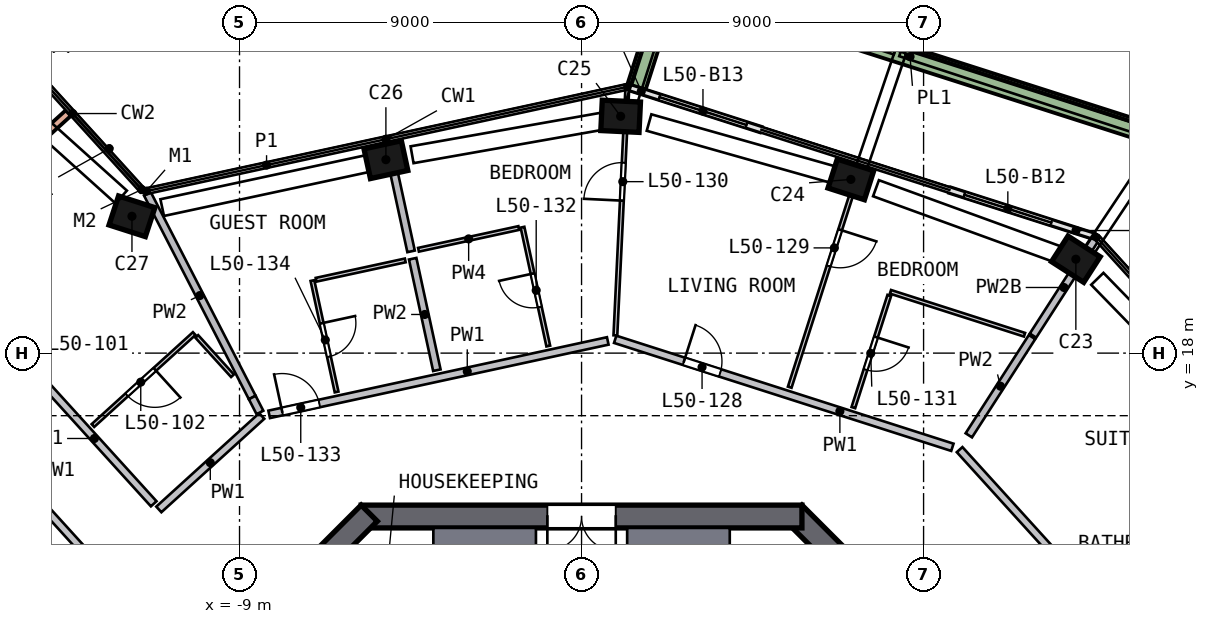
"""IFC4 building model, lengths in metres.
Left out: names, types, materials, properties, quantities, classifications, styles, units other than length and angle.
Written with IfcOpenShell. Run it as: python <this file> out.ifc"""

import sys

from ifc_helpers import new_model, si_unit, direction, frame, frame_2d, origin, origin_2d, place, context, subcontext, project, spatial, polyline, rectangle, outline, extrude, element, fill, save


model = new_model("IFC4")
c1 = context("Model", 3, precision=1e-05, world=origin(), true_north=direction((0.0, 1.0)))
c2 = subcontext(c1, "Body", "Model", "MODEL_VIEW")
j1 = project(units=[si_unit("LENGTHUNIT", "METRE"), si_unit("PLANEANGLEUNIT", "RADIAN")], contexts=[c1])
p1 = place(None, origin())
s1 = spatial("IfcSite", under=j1, at=p1, CompositionType="ELEMENT")
p2 = place(p1, origin())
s2 = spatial("IfcBuilding", under=s1, at=p2, CompositionType="ELEMENT")
p3 = place(p2, frame((0.0, 0.0, 205.5)))
s3 = spatial("IfcBuildingStorey", under=s2, at=p3, CompositionType="ELEMENT", Elevation=205.5)
p4 = place(p3, frame((13.125, 20.397, 0.0), z_axis=(-0.097538328, 0.061579147, 0.993324863), x_axis=(0.83540652, -0.537392943, 0.115346307)))
e1 = element("IfcColumn", 1, at=p4, inside=s3, PredefinedType="COLUMN", context=c2, shape_type="SweptSolid", body=[
    extrude(rectangle(XDim=1.0, YDim=0.8, at=origin_2d()), origin(), (0.0, 0.0, 1.0), 3.211),
])
p5 = place(p3, frame((7.217, 22.531, 0.0), z_axis=(-0.107456192, 0.033461235, 0.993646573), x_axis=(-0.946173408, 0.303463828, -0.11254149)))
e2 = element("IfcColumn", 2, at=p5, inside=s3, PredefinedType="COLUMN", context=c2, shape_type="SweptSolid", body=[
    extrude(rectangle(XDim=1.0, YDim=0.8, at=origin_2d()), origin(), (0.0, 0.0, 1.0), 3.21),
])
p6 = place(p3, frame((1.168, 24.227, 0.0), z_axis=(-0.115251947, 0.004561423, 0.993325819), x_axis=(0.992179948, -0.047708269, 0.115338076)))
e3 = element("IfcColumn", 3, at=p6, inside=s3, PredefinedType="COLUMN", context=c2, shape_type="SweptSolid", body=[
    extrude(rectangle(XDim=1.0, YDim=0.8, at=origin_2d()), origin(), (0.0, 0.0, 1.0), 3.211),
])
p7 = place(p3, frame((-5.016, 23.121, 0.0), z_axis=(-0.109813294, -0.024791644, 0.993643002), x_axis=(-0.971071774, -0.210587098, -0.112573017)))
e4 = element("IfcColumn", 4, at=p7, inside=s3, PredefinedType="COLUMN", context=c2, shape_type="SweptSolid", body=[
    extrude(rectangle(XDim=1.0, YDim=0.8, at=origin_2d()), origin(), (0.0, 0.0, 1.0), 3.21),
])
p8 = place(p3, frame((-11.707, 21.669, 0.0), z_axis=(-0.10253525, -0.056474196, 0.993124961), x_axis=(0.947085936, -0.310823275, 0.080106937)))
e5 = element("IfcColumn", 5, at=p8, inside=s3, PredefinedType="COLUMN", context=c2, shape_type="SweptSolid", body=[
    extrude(rectangle(XDim=1.0, YDim=0.8, at=origin_2d()), origin(), (0.0, 0.0, 1.0), 3.212),
])
p9 = place(p3, frame((13.788, 5.587, 0.0), z_axis=(0.0, 0.0, 1.0), x_axis=(-0.707106781, 0.707106781, 0.0)))
e6 = element("IfcWall", 6, at=p9, inside=s3, PredefinedType="SHEAR", context=c2, shape_type="SweptSolid", body=[
    extrude(rectangle(XDim=11.598, YDim=0.6, at=frame_2d((5.799, 0.0))), origin(), (0.0, 0.0, 1.0), 3.5),
])
p10 = place(p9, frame((2.099, 0.0, 0.0)))
e7 = element("IfcOpeningElement", 7, at=p10, cuts=e6, PredefinedType="OPENING", context=c2, shape_type="SweptSolid", body=[
    extrude(rectangle(XDim=1.2, YDim=2.1, at=frame_2d((0.6, 1.05))), frame((0.0, 0.31, 0.0), z_axis=(0.0, -1.0, 0.0), x_axis=(1.0, 0.0, 0.0)), (0.0, 0.0, 1.0), 0.62),
])
p11 = place(p3, frame((5.799, 13.7, 0.0), z_axis=(0.0, 0.0, 1.0), x_axis=(-1.0, 0.0, 0.0)))
e8 = element("IfcWall", 8, at=p11, inside=s3, PredefinedType="SHEAR", context=c2, shape_type="SweptSolid", body=[
    extrude(rectangle(XDim=11.598, YDim=0.6, at=frame_2d((5.799, 0.0))), origin(), (0.0, 0.0, 1.0), 3.5),
])
p12 = place(p11, frame((4.899, 0.0, 0.0)))
e9 = element("IfcOpeningElement", 9, at=p12, cuts=e8, PredefinedType="OPENING", context=c2, shape_type="SweptSolid", body=[
    extrude(rectangle(XDim=1.8, YDim=2.1, at=frame_2d((0.9, 1.05))), frame((0.0, 0.31, 0.0), z_axis=(0.0, -1.0, 0.0), x_axis=(1.0, 0.0, 0.0)), (0.0, 0.0, 1.0), 0.62),
])
p13 = place(p3, frame((-5.587, 13.788, 0.0), z_axis=(0.0, 0.0, 1.0), x_axis=(-0.707106781, -0.707106781, 0.0)))
e10 = element("IfcWall", 10, at=p13, inside=s3, PredefinedType="SHEAR", context=c2, shape_type="SweptSolid", body=[
    extrude(rectangle(XDim=11.598, YDim=0.6, at=frame_2d((5.799, 0.0))), origin(), (0.0, 0.0, 1.0), 3.5),
])
p14 = place(p3, frame((13.471, 21.079, 0.0), z_axis=(0.0, 0.0, 1.0), x_axis=(-0.952334788, 0.305054833, 0.0)))
e11 = element("IfcWall", 11, at=p14, inside=s3, PredefinedType="SOLIDWALL", context=c2, shape_type="SweptSolid", body=[
    extrude(rectangle(XDim=3.967, YDim=0.15, at=frame_2d((1.984, 0.0))), origin(), (0.0, 0.0, 1.0), 2.475),
])
p15 = place(p14, frame((1.167, 0.0, 0.0)))
e12 = element("IfcOpeningElement", 12, at=p15, cuts=e11, PredefinedType="OPENING", context=c2, shape_type="SweptSolid", body=[
    extrude(rectangle(XDim=2.4, YDim=2.4, at=frame_2d((1.2, 1.2))), frame((0.0, 0.085, 0.0), z_axis=(0.0, -1.0, 0.0), x_axis=(1.0, 0.0, 0.0)), (0.0, 0.0, 1.0), 0.17),
])
p16 = place(p3, frame((4.719, 23.882, 0.0), z_axis=(0.0, 0.0, 1.0), x_axis=(-0.952338489, 0.30504328, 0.0)))
e13 = element("IfcWall", 13, at=p16, inside=s3, PredefinedType="SOLIDWALL", context=c2, shape_type="SweptSolid", body=[
    extrude(rectangle(XDim=3.609, YDim=0.15, at=frame_2d((1.804, 0.0))), origin(), (0.0, 0.0, 1.0), 2.475),
])
p17 = place(p16, frame((0.4, 0.0, 0.0)))
e14 = element("IfcOpeningElement", 14, at=p17, cuts=e13, PredefinedType="OPENING", context=c2, shape_type="SweptSolid", body=[
    extrude(rectangle(XDim=2.4, YDim=2.4, at=frame_2d((1.2, 1.2))), frame((0.0, 0.085, 0.0), z_axis=(0.0, -1.0, 0.0), x_axis=(1.0, 0.0, 0.0)), (0.0, 0.0, 1.0), 0.17),
])
p18 = place(p3, frame((15.178, 23.708, 0.0), z_axis=(0.0, 0.0, 1.0), x_axis=(-0.952342728, 0.305030046, 0.0)))
e15 = element("IfcWall", 15, at=p18, inside=s3, PredefinedType="SOLIDWALL", context=c2, shape_type="SweptSolid", body=[
    extrude(rectangle(XDim=13.723, YDim=0.5, at=frame_2d((6.862, 0.0))), origin(), (0.0, 0.0, 1.0), 0.7),
])
p19 = place(p3, frame((2.271, 27.58, 0.0), z_axis=(0.0, 0.0, 1.0), x_axis=(-0.304998891, -0.952352706, 0.0)))
e16 = element("IfcWall", 16, at=p19, inside=s3, PredefinedType="SOLIDWALL", context=c2, shape_type="SweptSolid", body=[
    extrude(rectangle(XDim=2.699, YDim=0.5, at=frame_2d((1.35, 0.0))), origin(), (0.0, 0.0, 1.0), 0.7),
])
p20 = place(p3, frame((-22.906, 15.781, 0.0), z_axis=(0.0, 0.0, 1.0), x_axis=(0.740340942, 0.672231575, 0.0)))
e17 = element("IfcWall", 17, at=p20, inside=s3, PredefinedType="SOLIDWALL", context=c2, shape_type="SweptSolid", body=[
    extrude(rectangle(XDim=12.7, YDim=0.2, at=frame_2d((6.35, 0.0))), origin(), (0.0, 0.0, 1.0), 3.19),
])
p21 = place(p20, frame((5.45, 0.0, 0.0)))
e18 = element("IfcOpeningElement", 18, at=p21, cuts=e17, PredefinedType="OPENING", context=c2, shape_type="SweptSolid", body=[
    extrude(rectangle(XDim=1.8, YDim=2.4, at=frame_2d((0.9, 1.2))), frame((0.0, 0.11, 0.0), z_axis=(0.0, -1.0, 0.0), x_axis=(1.0, 0.0, 0.0)), (0.0, 0.0, 1.0), 0.22),
])
p22 = place(p3, origin())
e19 = element("IfcWall", 19, at=p22, inside=s3, PredefinedType="SOLIDWALL", context=c2, shape_type="SweptSolid", body=[
    extrude(outline(polyline([(3.9, 9.9), (3.7, 9.9), (3.7, 12.9), (1.4, 12.9), (1.4, 9.9), (1.2, 9.9), (1.2, 13.4), (3.9, 13.4), (3.9, 9.9)])), origin(), (0.0, 0.0, 1.0), 3.19),
])
p23 = place(p3, origin())
e20 = element("IfcWall", 20, at=p23, inside=s3, PredefinedType="SOLIDWALL", context=c2, shape_type="SweptSolid", body=[
    extrude(outline(polyline([(-3.9, 13.4), (-1.2, 13.4), (-1.2, 9.9), (-1.4, 9.9), (-1.4, 12.9), (-3.7, 12.9), (-3.7, 9.9), (-3.9, 9.9), (-3.9, 13.4)])), origin(), (0.0, 0.0, 1.0), 3.19),
])
p24 = place(p3, frame((-12.887, 12.556, 0.0), z_axis=(0.0, 0.0, 1.0), x_axis=(-0.672229236, 0.740343066, 0.0)))
e21 = element("IfcWall", 21, at=p24, inside=s3, PredefinedType="SOLIDWALL", context=c2, shape_type="SweptSolid", body=[
    extrude(rectangle(XDim=9.043, YDim=0.2, at=frame_2d((4.521, 0.0))), origin(), (0.0, 0.0, 1.0), 3.19),
])
p25 = place(p24, frame((4.8, 0.0, 0.0)))
e22 = element("IfcOpeningElement", 22, at=p25, cuts=e21, PredefinedType="OPENING", context=c2, shape_type="SweptSolid", body=[
    extrude(rectangle(XDim=1.0, YDim=2.1, at=frame_2d((0.5, 1.05))), frame((0.0, 0.11, 0.0), z_axis=(0.0, -1.0, 0.0), x_axis=(1.0, 0.0, 0.0)), (0.0, 0.0, 1.0), 0.22),
])
p26 = place(p3, frame((-17.337, 20.73, 0.0), z_axis=(0.0, 0.0, 1.0), x_axis=(0.672244033, -0.74032963, 0.0)))
e23 = element("IfcWall", 23, at=p26, inside=s3, PredefinedType="SOLIDWALL", context=c2, shape_type="SweptSolid", body=[
    extrude(rectangle(XDim=9.043, YDim=0.2, at=frame_2d((4.522, 0.0))), origin(), (0.0, 0.0, 1.0), 3.19),
])
p27 = place(p26, frame((3.2, 0.0, 0.0)))
e24 = element("IfcOpeningElement", 24, at=p27, cuts=e23, PredefinedType="OPENING", context=c2, shape_type="SweptSolid", body=[
    extrude(rectangle(XDim=1.0, YDim=2.1, at=frame_2d((0.5, 1.05))), frame((0.0, 0.11, 0.0), z_axis=(0.0, -1.0, 0.0), x_axis=(1.0, 0.0, 0.0)), (0.0, 0.0, 1.0), 0.22),
])
p28 = place(p3, frame((-8.415, 16.346, 0.0), z_axis=(0.0, 0.0, 1.0), x_axis=(-0.74032347, -0.672250817, 0.0)))
e25 = element("IfcWall", 25, at=p28, inside=s3, PredefinedType="SOLIDWALL", context=c2, shape_type="SweptSolid", body=[
    extrude(rectangle(XDim=3.658, YDim=0.2, at=frame_2d((1.829, 0.0))), origin(), (0.0, 0.0, 1.0), 3.19),
])
p29 = place(p3, frame((-8.219, 16.388, 0.0), z_axis=(0.0, 0.0, 1.0), x_axis=(0.977265465, 0.212019365, 0.0)))
e26 = element("IfcWall", 26, at=p29, inside=s3, PredefinedType="SOLIDWALL", context=c2, shape_type="SweptSolid", body=[
    extrude(rectangle(XDim=9.116, YDim=0.2, at=frame_2d((4.558, 0.0))), origin(), (0.0, 0.0, 1.0), 3.19),
])
p30 = place(p29, frame((0.35, 0.0, 0.0)))
e27 = element("IfcOpeningElement", 27, at=p30, cuts=e26, PredefinedType="OPENING", context=c2, shape_type="SweptSolid", body=[
    extrude(rectangle(XDim=1.0, YDim=2.1, at=frame_2d((0.5, 1.05))), frame((0.0, 0.11, 0.0), z_axis=(0.0, -1.0, 0.0), x_axis=(1.0, 0.0, 0.0)), (0.0, 0.0, 1.0), 0.22),
])
p31 = place(p3, frame((0.885, 18.363, 0.0), z_axis=(0.0, 0.0, 1.0), x_axis=(0.952343787, -0.305026737, 0.0)))
e28 = element("IfcWall", 28, at=p31, inside=s3, PredefinedType="SOLIDWALL", context=c2, shape_type="SweptSolid", body=[
    extrude(rectangle(XDim=9.317, YDim=0.2, at=frame_2d((4.658, 0.0))), origin(), (0.0, 0.0, 1.0), 3.19),
])
p32 = place(p31, frame((1.9, 0.0, 0.0)))
e29 = element("IfcOpeningElement", 29, at=p32, cuts=e28, PredefinedType="OPENING", context=c2, shape_type="SweptSolid", body=[
    extrude(rectangle(XDim=1.0, YDim=2.1, at=frame_2d((0.5, 1.05))), frame((0.0, 0.11, 0.0), z_axis=(0.0, -1.0, 0.0), x_axis=(1.0, 0.0, 0.0)), (0.0, 0.0, 1.0), 0.22),
])
p33 = place(p3, frame((9.948, 15.46, 0.0), z_axis=(0.0, 0.0, 1.0), x_axis=(0.672246163, -0.740327695, 0.0)))
e30 = element("IfcWall", 30, at=p33, inside=s3, PredefinedType="SOLIDWALL", context=c2, shape_type="SweptSolid", body=[
    extrude(rectangle(XDim=9.316, YDim=0.2, at=frame_2d((4.658, 0.0))), origin(), (0.0, 0.0, 1.0), 3.19),
])
p34 = place(p33, frame((5.15, 0.0, 0.0)))
e31 = element("IfcOpeningElement", 31, at=p34, cuts=e30, PredefinedType="OPENING", context=c2, shape_type="SweptSolid", body=[
    extrude(rectangle(XDim=1.0, YDim=2.1, at=frame_2d((0.5, 1.05))), frame((0.0, 0.11, 0.0), z_axis=(0.0, -1.0, 0.0), x_axis=(1.0, 0.0, 0.0)), (0.0, 0.0, 1.0), 0.22),
])
p35 = place(p3, frame((-11.427, 22.196, 0.0), z_axis=(0.0, 0.0, 1.0), x_axis=(0.457722012, -0.88909536, 0.0)))
e32 = element("IfcWall", 32, at=p35, inside=s3, PredefinedType="SOLIDWALL", context=c2, shape_type="SweptSolid", body=[
    extrude(rectangle(XDim=6.032, YDim=0.2, at=frame_2d((3.016, 0.0))), origin(), (0.0, 0.0, 1.0), 3.19),
])
p36 = place(p3, frame((-8.666, 16.833, 0.0), z_axis=(0.0, 0.0, 1.0), x_axis=(0.457745769, -0.889083129, 0.0)))
e33 = element("IfcWall", 33, at=p36, inside=s3, PredefinedType="SOLIDWALL", context=c2, shape_type="SweptSolid", body=[
    extrude(rectangle(XDim=0.444, YDim=0.2, at=frame_2d((0.222, 0.0))), origin(), (0.0, 0.0, 1.0), 3.19),
])
p37 = place(p3, frame((-4.486, 20.677, 0.0), z_axis=(0.0, 0.0, 1.0), x_axis=(-0.212037924, 0.977261438, 0.0)))
e34 = element("IfcWall", 34, at=p37, inside=s3, PredefinedType="SOLIDWALL", context=c2, shape_type="SweptSolid", body=[
    extrude(rectangle(XDim=2.95, YDim=0.2, at=frame_2d((1.475, 0.0))), origin(), (0.0, 0.0, 1.0), 3.19),
])
p38 = place(p3, frame((-3.807, 17.55, 0.0), z_axis=(0.0, 0.0, 1.0), x_axis=(-0.211933299, 0.977284133, 0.0)))
e35 = element("IfcWall", 35, at=p38, inside=s3, PredefinedType="SOLIDWALL", context=c2, shape_type="SweptSolid", body=[
    extrude(rectangle(XDim=3.002, YDim=0.2, at=frame_2d((1.501, 0.0))), origin(), (0.0, 0.0, 1.0), 3.19),
])
p39 = place(p3, frame((10.19, 15.837, 0.0), z_axis=(0.0, 0.0, 1.0), x_axis=(0.541122731, 0.840943631, 0.0)))
e36 = element("IfcWall", 36, at=p39, inside=s3, PredefinedType="SOLIDWALL", context=c2, shape_type="SweptSolid", body=[
    extrude(rectangle(XDim=3.075, YDim=0.2, at=frame_2d((1.537, 0.0))), origin(), (0.0, 0.0, 1.0), 3.19),
])
p40 = place(p3, frame((11.879, 18.461, 0.0), z_axis=(0.0, 0.0, 1.0), x_axis=(0.541138592, 0.840933425, 0.0)))
e37 = element("IfcWall", 37, at=p40, inside=s3, PredefinedType="SOLIDWALL", context=c2, shape_type="SweptSolid", body=[
    extrude(rectangle(XDim=3.011, YDim=0.2, at=frame_2d((1.506, 0.0))), origin(), (0.0, 0.0, 1.0), 2.69),
])
p41 = place(p3, frame((-10.192, 18.514, 0.0), z_axis=(0.0, 0.0, 1.0), x_axis=(-0.740363402, -0.672206837, 0.0)))
e38 = element("IfcWall", 38, at=p41, inside=s3, PredefinedType="PARTITIONING", context=c2, shape_type="SweptSolid", body=[
    extrude(rectangle(XDim=3.6, YDim=0.1, at=frame_2d((1.8, 0.0))), origin(), (0.0, 0.0, 1.0), 3.19),
])
p42 = place(p41, frame((1.4, 0.0, 0.0)))
e39 = element("IfcOpeningElement", 39, at=p42, cuts=e38, PredefinedType="OPENING", context=c2, shape_type="SweptSolid", body=[
    extrude(rectangle(XDim=1.0, YDim=2.1, at=frame_2d((0.5, 1.05))), frame((0.0, 0.06, 0.0), z_axis=(0.0, -1.0, 0.0), x_axis=(1.0, 0.0, 0.0)), (0.0, 0.0, 1.0), 0.12),
])
p43 = place(p3, frame((-10.125, 18.44, 0.0), z_axis=(0.0, 0.0, 1.0), x_axis=(0.672246935, -0.740326994, 0.0)))
e40 = element("IfcWall", 40, at=p43, inside=s3, PredefinedType="PARTITIONING", context=c2, shape_type="SweptSolid", body=[
    extrude(rectangle(XDim=1.399, YDim=0.1, at=frame_2d((0.699, 0.0))), origin(), (0.0, 0.0, 1.0), 3.19),
])
p44 = place(p3, frame((-7.082, 19.909, 0.0), z_axis=(0.0, 0.0, 1.0), x_axis=(0.212007276, -0.977268088, 0.0)))
e41 = element("IfcWall", 41, at=p44, inside=s3, PredefinedType="PARTITIONING", context=c2, shape_type="SweptSolid", body=[
    extrude(rectangle(XDim=3.0, YDim=0.1, at=frame_2d((1.5, 0.0))), origin(), (0.0, 0.0, 1.0), 3.19),
])
p45 = place(p44, frame((1.15, 0.0, 0.0)))
e42 = element("IfcOpeningElement", 42, at=p45, cuts=e41, PredefinedType="OPENING", context=c2, shape_type="SweptSolid", body=[
    extrude(rectangle(XDim=0.9, YDim=2.1, at=frame_2d((0.45, 1.05))), frame((0.0, 0.06, 0.0), z_axis=(0.0, -1.0, 0.0), x_axis=(1.0, 0.0, 0.0)), (0.0, 0.0, 1.0), 0.12),
])
p46 = place(p3, frame((-6.984, 19.931, 0.0), z_axis=(0.0, 0.0, 1.0), x_axis=(0.977266258, 0.212015707, 0.0)))
e43 = element("IfcWall", 43, at=p46, inside=s3, PredefinedType="PARTITIONING", context=c2, shape_type="SweptSolid", body=[
    extrude(rectangle(XDim=2.4, YDim=0.1, at=frame_2d((1.2, 0.0))), origin(), (0.0, 0.0, 1.0), 3.19),
])
p47 = place(p3, frame((-1.652, 21.292, 0.0), z_axis=(0.0, 0.0, 1.0), x_axis=(-0.977261971, -0.212035467, 0.0)))
e44 = element("IfcWall", 44, at=p47, inside=s3, PredefinedType="PARTITIONING", context=c2, shape_type="SweptSolid", body=[
    extrude(rectangle(XDim=2.7, YDim=0.1, at=frame_2d((1.35, 0.0))), origin(), (0.0, 0.0, 1.0), 3.19),
])
p48 = place(p3, frame((-0.875, 18.186, 0.0), z_axis=(0.0, 0.0, 1.0), x_axis=(-0.21200838, 0.977267848, 0.0)))
e45 = element("IfcWall", 45, at=p48, inside=s3, PredefinedType="PARTITIONING", context=c2, shape_type="SweptSolid", body=[
    extrude(rectangle(XDim=3.2, YDim=0.1, at=frame_2d((1.6, 0.0))), origin(), (0.0, 0.0, 1.0), 3.19),
])
p49 = place(p48, frame((1.05, 0.0, 0.0)))
e46 = element("IfcOpeningElement", 46, at=p49, cuts=e45, PredefinedType="OPENING", context=c2, shape_type="SweptSolid", body=[
    extrude(rectangle(XDim=0.9, YDim=2.1, at=frame_2d((0.45, 1.05))), frame((0.0, 0.06, 0.0), z_axis=(0.0, -1.0, 0.0), x_axis=(1.0, 0.0, 0.0)), (0.0, 0.0, 1.0), 0.12),
])
p50 = place(p3, frame((0.89, 18.467, 0.0), z_axis=(0.0, 0.0, 1.0), x_axis=(0.048143701, 0.99884042, 0.0)))
e47 = element("IfcWall", 47, at=p50, inside=s3, PredefinedType="PARTITIONING", context=c2, shape_type="SweptSolid", body=[
    extrude(rectangle(XDim=6.476, YDim=0.1, at=frame_2d((3.238, 0.0))), origin(), (0.0, 0.0, 1.0), 3.19),
])
p51 = place(p50, frame((3.55, 0.0, 0.0)))
e48 = element("IfcOpeningElement", 48, at=p51, cuts=e47, PredefinedType="OPENING", context=c2, shape_type="SweptSolid", body=[
    extrude(rectangle(XDim=1.0, YDim=2.1, at=frame_2d((0.5, 1.05))), frame((0.0, 0.06, 0.0), z_axis=(0.0, -1.0, 0.0), x_axis=(1.0, 0.0, 0.0)), (0.0, 0.0, 1.0), 0.12),
])
p52 = place(p3, frame((7.354, 22.959, 0.0), z_axis=(0.0, 0.0, 1.0), x_axis=(-0.305034988, -0.952341145, 0.0)))
e49 = element("IfcWall", 49, at=p52, inside=s3, PredefinedType="PARTITIONING", context=c2, shape_type="SweptSolid", body=[
    extrude(rectangle(XDim=6.15, YDim=0.1, at=frame_2d((3.075, 0.0))), origin(), (0.0, 0.0, 1.0), 3.19),
])
p53 = place(p52, frame((1.8, 0.0, 0.0)))
e50 = element("IfcOpeningElement", 50, at=p53, cuts=e49, PredefinedType="OPENING", context=c2, shape_type="SweptSolid", body=[
    extrude(rectangle(XDim=1.0, YDim=2.1, at=frame_2d((0.5, 1.05))), frame((0.0, 0.06, 0.0), z_axis=(0.0, -1.0, 0.0), x_axis=(1.0, 0.0, 0.0)), (0.0, 0.0, 1.0), 0.12),
])
p54 = place(p3, frame((8.098, 19.518, 0.0), z_axis=(0.0, 0.0, 1.0), x_axis=(-0.305030051, -0.952342726, 0.0)))
e51 = element("IfcWall", 51, at=p54, inside=s3, PredefinedType="PARTITIONING", context=c2, shape_type="SweptSolid", body=[
    extrude(rectangle(XDim=3.1, YDim=0.1, at=frame_2d((1.55, 0.0))), origin(), (0.0, 0.0, 1.0), 3.19),
])
p55 = place(p54, frame((1.15, 0.0, 0.0)))
e52 = element("IfcOpeningElement", 52, at=p55, cuts=e51, PredefinedType="OPENING", context=c2, shape_type="SweptSolid", body=[
    extrude(rectangle(XDim=0.9, YDim=2.1, at=frame_2d((0.45, 1.05))), frame((0.0, 0.06, 0.0), z_axis=(0.0, -1.0, 0.0), x_axis=(1.0, 0.0, 0.0)), (0.0, 0.0, 1.0), 0.12),
])
p56 = place(p3, frame((11.656, 18.484, 0.0), z_axis=(0.0, 0.0, 1.0), x_axis=(-0.952360606, 0.304974221, 0.0)))
e53 = element("IfcWall", 53, at=p56, inside=s3, PredefinedType="PARTITIONING", context=c2, shape_type="SweptSolid", body=[
    extrude(rectangle(XDim=3.704, YDim=0.1, at=frame_2d((1.852, 0.0))), origin(), (0.0, 0.0, 1.0), 3.19),
])
p57 = place(p15, origin())
e54 = element("IfcDoor", 54, at=p57, inside=s3, OperationType="SLIDING_TO_LEFT", PredefinedType="DOOR", context=c2, shape_type="SweptSolid", body=[
    extrude(rectangle(XDim=2.4, YDim=2.4, at=frame_2d((1.2, 1.2))), frame((0.0, 0.025, 0.0), z_axis=(0.0, -1.0, 0.0), x_axis=(1.0, 0.0, 0.0)), (0.0, 0.0, 1.0), 0.05),
])
fill(e12, e54)
p58 = place(p17, origin())
e55 = element("IfcDoor", 55, at=p58, inside=s3, OperationType="SLIDING_TO_RIGHT", PredefinedType="DOOR", context=c2, shape_type="SweptSolid", body=[
    extrude(rectangle(XDim=2.4, YDim=2.4, at=frame_2d((1.2, 1.2))), frame((0.0, 0.025, 0.0), z_axis=(0.0, -1.0, 0.0), x_axis=(1.0, 0.0, 0.0)), (0.0, 0.0, 1.0), 0.05),
])
fill(e14, e55)
p59 = place(p12, origin())
e56 = element("IfcDoor", 56, at=p59, inside=s3, OperationType="DOUBLE_DOOR_SINGLE_SWING", PredefinedType="DOOR", context=c2, shape_type="SweptSolid", body=[
    extrude(rectangle(XDim=1.8, YDim=2.1, at=frame_2d((0.9, 1.05))), frame((0.0, 0.025, 0.0), z_axis=(0.0, -1.0, 0.0), x_axis=(1.0, 0.0, 0.0)), (0.0, 0.0, 1.0), 0.05),
])
fill(e9, e56)
p60 = place(p42, origin())
e57 = element("IfcDoor", 57, at=p60, inside=s3, OperationType="SINGLE_SWING_LEFT", PredefinedType="DOOR", context=c2, shape_type="SweptSolid", body=[
    extrude(rectangle(XDim=1.0, YDim=2.1, at=frame_2d((0.5, 1.05))), frame((0.0, 0.025, 0.0), z_axis=(0.0, -1.0, 0.0), x_axis=(1.0, 0.0, 0.0)), (0.0, 0.0, 1.0), 0.05),
])
fill(e39, e57)
p61 = place(p32, origin())
e58 = element("IfcDoor", 58, at=p61, inside=s3, OperationType="SINGLE_SWING_LEFT", PredefinedType="DOOR", context=c2, shape_type="SweptSolid", body=[
    extrude(rectangle(XDim=1.0, YDim=2.1, at=frame_2d((0.5, 1.05))), frame((0.0, 0.025, 0.0), z_axis=(0.0, -1.0, 0.0), x_axis=(1.0, 0.0, 0.0)), (0.0, 0.0, 1.0), 0.05),
])
fill(e29, e58)
p62 = place(p53, origin())
e59 = element("IfcDoor", 59, at=p62, inside=s3, OperationType="SINGLE_SWING_LEFT", PredefinedType="DOOR", context=c2, shape_type="SweptSolid", body=[
    extrude(rectangle(XDim=1.0, YDim=2.1, at=frame_2d((0.5, 1.05))), frame((0.0, 0.025, 0.0), z_axis=(0.0, -1.0, 0.0), x_axis=(1.0, 0.0, 0.0)), (0.0, 0.0, 1.0), 0.05),
])
fill(e50, e59)
p63 = place(p51, origin())
e60 = element("IfcDoor", 60, at=p63, inside=s3, OperationType="SINGLE_SWING_LEFT", PredefinedType="DOOR", context=c2, shape_type="SweptSolid", body=[
    extrude(rectangle(XDim=1.0, YDim=2.1, at=frame_2d((0.5, 1.05))), frame((0.0, 0.025, 0.0), z_axis=(0.0, -1.0, 0.0), x_axis=(1.0, 0.0, 0.0)), (0.0, 0.0, 1.0), 0.05),
])
fill(e48, e60)
p64 = place(p55, origin())
e61 = element("IfcDoor", 61, at=p64, inside=s3, OperationType="SINGLE_SWING_LEFT", PredefinedType="DOOR", context=c2, shape_type="SweptSolid", body=[
    extrude(rectangle(XDim=0.9, YDim=2.1, at=frame_2d((0.45, 1.05))), frame((0.0, 0.025, 0.0), z_axis=(0.0, -1.0, 0.0), x_axis=(1.0, 0.0, 0.0)), (0.0, 0.0, 1.0), 0.05),
])
fill(e52, e61)
p65 = place(p49, origin())
e62 = element("IfcDoor", 62, at=p65, inside=s3, OperationType="SINGLE_SWING_RIGHT", PredefinedType="DOOR", context=c2, shape_type="SweptSolid", body=[
    extrude(rectangle(XDim=0.9, YDim=2.1, at=frame_2d((0.45, 1.05))), frame((0.0, 0.025, 0.0), z_axis=(0.0, -1.0, 0.0), x_axis=(1.0, 0.0, 0.0)), (0.0, 0.0, 1.0), 0.05),
])
fill(e46, e62)
p66 = place(p30, origin())
e63 = element("IfcDoor", 63, at=p66, inside=s3, OperationType="SINGLE_SWING_LEFT", PredefinedType="DOOR", context=c2, shape_type="SweptSolid", body=[
    extrude(rectangle(XDim=1.0, YDim=2.1, at=frame_2d((0.5, 1.05))), frame((0.0, 0.025, 0.0), z_axis=(0.0, -1.0, 0.0), x_axis=(1.0, 0.0, 0.0)), (0.0, 0.0, 1.0), 0.05),
])
fill(e27, e63)
p67 = place(p45, origin())
e64 = element("IfcDoor", 64, at=p67, inside=s3, OperationType="SINGLE_SWING_LEFT", PredefinedType="DOOR", context=c2, shape_type="SweptSolid", body=[
    extrude(rectangle(XDim=0.9, YDim=2.1, at=frame_2d((0.45, 1.05))), frame((0.0, 0.025, 0.0), z_axis=(0.0, -1.0, 0.0), x_axis=(1.0, 0.0, 0.0)), (0.0, 0.0, 1.0), 0.05),
])
fill(e42, e64)
save(model, sys.argv[1])
